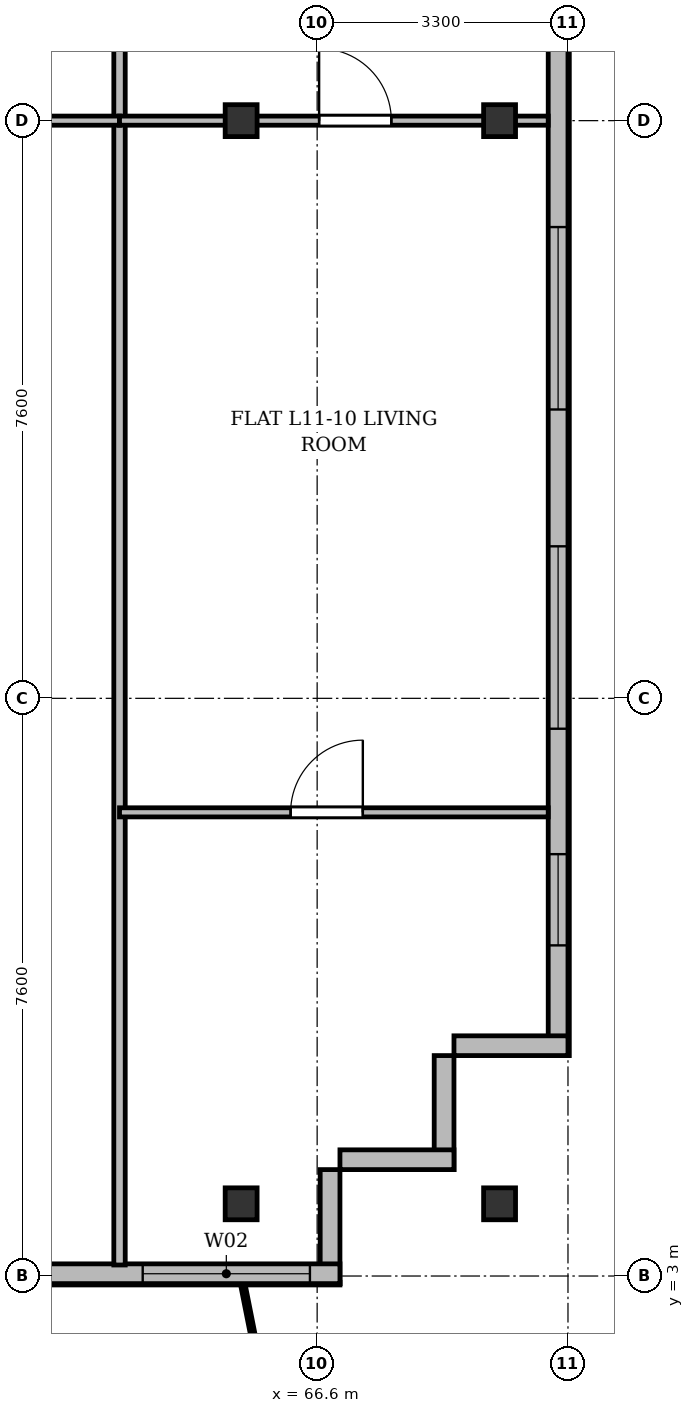
"""IFC4 building model, lengths in metres.
Left out: names, types, materials, properties, quantities, classifications, styles, units other than length and angle.
Written with IfcOpenShell. Run it as: python <this file> out.ifc"""

import sys

from ifc_helpers import new_model, si_unit, direction, frame, frame_2d, origin, origin_2d, place, context, subcontext, project, spatial, rectangle, i_section, extrude, source, transform, mapped, element, fill, save


model = new_model("IFC4")
c1 = context("Model", 3, precision=1e-05, world=origin(), true_north=direction((0.0, 1.0)))
c2 = subcontext(c1, "Body", "Model", "MODEL_VIEW")
j1 = project(units=[si_unit("LENGTHUNIT", "METRE"), si_unit("PLANEANGLEUNIT", "RADIAN")], contexts=[c1])
p1 = place(None, origin())
s1 = spatial("IfcSite", under=j1, at=p1, CompositionType="ELEMENT")
p2 = place(p1, origin())
s2 = spatial("IfcBuilding", under=s1, at=p2, CompositionType="ELEMENT")
p3 = place(p2, frame((0.0, 0.0, 45.1)))
s3 = spatial("IfcBuildingStorey", under=s2, at=p3, CompositionType="ELEMENT", Elevation=45.1)
m1 = source(origin(), c2, "Body", "SweptSolid", [
    extrude(i_section(OverallWidth=0.42, OverallDepth=0.42, WebThickness=0.026, FlangeThickness=0.04, at=origin_2d()), origin(), (0.0, 0.0, 1.0), 3.6),
])
for number, where, z_axis, x_axis in (
    (1, (65.6, 3.95, 0.0), (0.0, 0.0, 1.0), (1.0, 0.0, 0.0)),
    (2, (65.6, 18.2, 0.0), (0.0, 0.0, 1.0), (1.0, 0.0, 0.0)),
    (3, (69.0, 3.95, 0.0), (0.0, 0.0, 1.0), (1.0, 0.0, 0.0)),
    (4, (69.0, 18.2, 0.0), (0.0, 0.0, 1.0), (1.0, 0.0, 0.0)),
):
    element("IfcColumn", number, at=place(p3, frame(where, z_axis=z_axis, x_axis=x_axis)), inside=s3, PredefinedType="COLUMN", context=c2, shape_type="MappedRepresentation", body=[
        mapped(m1, transform((0.0, 0.0, 0.0), x_axis=(1.0, 0.0, 0.0), y_axis=(0.0, 1.0, 0.0), z_axis=(0.0, 0.0, 1.0), scale=1.0)),
    ])
p4 = place(p3, frame((69.77, 45.5, 0.0), z_axis=(0.0, 0.0, 1.0), x_axis=(0.0, -1.0, 0.0)))
e5 = element("IfcWall", 5, at=p4, inside=s3, PredefinedType="SOLIDWALL", context=c2, shape_type="SweptSolid", body=[
    extrude(rectangle(XDim=39.6, YDim=0.26, at=frame_2d((19.8, 0.0))), origin(), (0.0, 0.0, 1.0), 3.34),
])
p5 = place(p4, frame((36.95, 0.0, 0.92)))
e6 = element("IfcOpeningElement", 6, at=p5, cuts=e5, PredefinedType="OPENING", context=c2, shape_type="SweptSolid", body=[
    extrude(rectangle(XDim=1.2, YDim=1.65, at=frame_2d((0.6, 0.825))), frame((0.0, 0.14, 0.0), z_axis=(0.0, -1.0, 0.0), x_axis=(1.0, 0.0, 0.0)), (0.0, 0.0, 1.0), 0.28),
])
p6 = place(p4, frame((32.9, 0.0, 0.92)))
e7 = element("IfcOpeningElement", 7, at=p6, cuts=e5, PredefinedType="OPENING", context=c2, shape_type="SweptSolid", body=[
    extrude(rectangle(XDim=2.4, YDim=2.1, at=frame_2d((1.2, 1.05))), frame((0.0, 0.14, 0.0), z_axis=(0.0, -1.0, 0.0), x_axis=(1.0, 0.0, 0.0)), (0.0, 0.0, 1.0), 0.28),
])
p7 = place(p4, frame((28.7, 0.0, 0.92)))
e8 = element("IfcOpeningElement", 8, at=p7, cuts=e5, PredefinedType="OPENING", context=c2, shape_type="SweptSolid", body=[
    extrude(rectangle(XDim=2.4, YDim=2.1, at=frame_2d((1.2, 1.05))), frame((0.0, 0.14, 0.0), z_axis=(0.0, -1.0, 0.0), x_axis=(1.0, 0.0, 0.0)), (0.0, 0.0, 1.0), 0.28),
])
p8 = place(p4, frame((21.5, 0.0, 0.92)))
e9 = element("IfcOpeningElement", 9, at=p8, cuts=e5, PredefinedType="OPENING", context=c2, shape_type="SweptSolid", body=[
    extrude(rectangle(XDim=2.4, YDim=2.1, at=frame_2d((1.2, 1.05))), frame((0.0, 0.14, 0.0), z_axis=(0.0, -1.0, 0.0), x_axis=(1.0, 0.0, 0.0)), (0.0, 0.0, 1.0), 0.28),
])
p9 = place(p4, frame((7.5, 0.0, 0.92)))
e10 = element("IfcOpeningElement", 10, at=p9, cuts=e5, PredefinedType="OPENING", context=c2, shape_type="SweptSolid", body=[
    extrude(rectangle(XDim=2.4, YDim=2.1, at=frame_2d((1.2, 1.05))), frame((0.0, 0.14, 0.0), z_axis=(0.0, -1.0, 0.0), x_axis=(1.0, 0.0, 0.0)), (0.0, 0.0, 1.0), 0.28),
])
p10 = place(p4, frame((4.5, 0.0, 0.92)))
e11 = element("IfcOpeningElement", 11, at=p10, cuts=e5, PredefinedType="OPENING", context=c2, shape_type="SweptSolid", body=[
    extrude(rectangle(XDim=1.2, YDim=1.65, at=frame_2d((0.6, 0.825))), frame((0.0, 0.14, 0.0), z_axis=(0.0, -1.0, 0.0), x_axis=(1.0, 0.0, 0.0)), (0.0, 0.0, 1.0), 0.28),
])
p11 = place(p4, frame((1.15, 0.0, 0.92)))
e12 = element("IfcOpeningElement", 12, at=p11, cuts=e5, PredefinedType="OPENING", context=c2, shape_type="SweptSolid", body=[
    extrude(rectangle(XDim=1.2, YDim=1.65, at=frame_2d((0.6, 0.825))), frame((0.0, 0.14, 0.0), z_axis=(0.0, -1.0, 0.0), x_axis=(1.0, 0.0, 0.0)), (0.0, 0.0, 1.0), 0.28),
])
p12 = place(p3, frame((69.9, 6.03, 0.0), z_axis=(0.0, 0.0, 1.0), x_axis=(-1.0, 0.0, 0.0)))
e13 = element("IfcWall", 13, at=p12, inside=s3, PredefinedType="SOLIDWALL", context=c2, shape_type="SweptSolid", body=[
    extrude(rectangle(XDim=1.5, YDim=0.26, at=frame_2d((0.75, 0.0))), origin(), (0.0, 0.0, 1.0), 2.752),
])
for number, where, z_axis, x_axis in (
    (14, (68.27, 5.9, 0.0), (0.0, 0.0, 1.0), (0.0, -1.0, 0.0)),
    (15, (68.4, 4.53, 0.0), (0.0, 0.0, 1.0), (-1.0, 0.0, 0.0)),
):
    element("IfcWall", number, at=place(p3, frame(where, z_axis=z_axis, x_axis=x_axis)), inside=s3, PredefinedType="SOLIDWALL", context=c2, shape_type="SweptSolid", body=[
        extrude(rectangle(XDim=1.5, YDim=0.26, at=frame_2d((0.75, 0.0))), origin(), (0.0, 0.0, 1.0), 3.34),
    ])
p13 = place(p3, frame((66.77, 4.4, 0.0), z_axis=(0.0, 0.0, 1.0), x_axis=(0.0, -1.0, 0.0)))
e16 = element("IfcWall", 16, at=p13, inside=s3, PredefinedType="SOLIDWALL", context=c2, shape_type="SweptSolid", body=[
    extrude(rectangle(XDim=1.5, YDim=0.26, at=frame_2d((0.75, 0.0))), origin(), (0.0, 0.0, 1.0), 2.69),
])
p14 = place(p3, frame((66.9, 3.03, 0.0), z_axis=(0.0, 0.0, 1.0), x_axis=(-1.0, 0.0, 0.0)))
e17 = element("IfcWall", 17, at=p14, inside=s3, PredefinedType="SOLIDWALL", context=c2, shape_type="SweptSolid", body=[
    extrude(rectangle(XDim=59.4, YDim=0.26, at=frame_2d((29.7, 0.0))), origin(), (0.0, 0.0, 1.0), 3.34),
])
p15 = place(p14, frame((0.395, 0.0, 0.9)))
e18 = element("IfcOpeningElement", 18, at=p15, cuts=e17, PredefinedType="OPENING", context=c2, shape_type="SweptSolid", body=[
    extrude(rectangle(XDim=2.2, YDim=1.8, at=frame_2d((1.1, 0.9))), frame((0.0, 0.14, 0.0), z_axis=(0.0, -1.0, 0.0), x_axis=(1.0, 0.0, 0.0)), (0.0, 0.0, 1.0), 0.28),
])
p16 = place(p14, frame((4.75, 0.0, 0.9)))
e19 = element("IfcOpeningElement", 19, at=p16, cuts=e17, PredefinedType="OPENING", context=c2, shape_type="SweptSolid", body=[
    extrude(rectangle(XDim=1.5, YDim=1.75, at=frame_2d((0.75, 0.875))), frame((0.0, 0.14, 0.0), z_axis=(0.0, -1.0, 0.0), x_axis=(1.0, 0.0, 0.0)), (0.0, 0.0, 1.0), 0.28),
])
p17 = place(p14, frame((11.0, 0.0, 0.9)))
e20 = element("IfcOpeningElement", 20, at=p17, cuts=e17, PredefinedType="OPENING", context=c2, shape_type="SweptSolid", body=[
    extrude(rectangle(XDim=2.0, YDim=1.95, at=frame_2d((1.0, 0.975))), frame((0.0, 0.14, 0.0), z_axis=(0.0, -1.0, 0.0), x_axis=(1.0, 0.0, 0.0)), (0.0, 0.0, 1.0), 0.28),
])
p18 = place(p14, frame((17.007, 0.0, 0.0)))
e21 = element("IfcOpeningElement", 21, at=p18, cuts=e17, PredefinedType="OPENING", context=c2, shape_type="SweptSolid", body=[
    extrude(rectangle(XDim=1.2, YDim=2.2, at=frame_2d((0.6, 1.1))), frame((0.0, 0.14, 0.0), z_axis=(0.0, -1.0, 0.0), x_axis=(1.0, 0.0, 0.0)), (0.0, 0.0, 1.0), 0.28),
])
p19 = place(p14, frame((20.4, 0.0, 0.9)))
e22 = element("IfcOpeningElement", 22, at=p19, cuts=e17, PredefinedType="OPENING", context=c2, shape_type="SweptSolid", body=[
    extrude(rectangle(XDim=1.8, YDim=1.8, at=frame_2d((0.9, 0.9))), frame((0.0, 0.14, 0.0), z_axis=(0.0, -1.0, 0.0), x_axis=(1.0, 0.0, 0.0)), (0.0, 0.0, 1.0), 0.28),
])
p20 = place(p14, frame((24.4, 0.0, 0.9)))
e23 = element("IfcOpeningElement", 23, at=p20, cuts=e17, PredefinedType="OPENING", context=c2, shape_type="SweptSolid", body=[
    extrude(rectangle(XDim=2.2, YDim=1.8, at=frame_2d((1.1, 0.9))), frame((0.0, 0.14, 0.0), z_axis=(0.0, -1.0, 0.0), x_axis=(1.0, 0.0, 0.0)), (0.0, 0.0, 1.0), 0.28),
])
p21 = place(p14, frame((31.35, 0.0, 0.9)))
e24 = element("IfcOpeningElement", 24, at=p21, cuts=e17, PredefinedType="OPENING", context=c2, shape_type="SweptSolid", body=[
    extrude(rectangle(XDim=1.5, YDim=1.75, at=frame_2d((0.75, 0.875))), frame((0.0, 0.14, 0.0), z_axis=(0.0, -1.0, 0.0), x_axis=(1.0, 0.0, 0.0)), (0.0, 0.0, 1.0), 0.28),
])
p22 = place(p14, frame((38.9, 0.0, 0.9)))
e25 = element("IfcOpeningElement", 25, at=p22, cuts=e17, PredefinedType="OPENING", context=c2, shape_type="SweptSolid", body=[
    extrude(rectangle(XDim=2.0, YDim=1.95, at=frame_2d((1.0, 0.975))), frame((0.0, 0.14, 0.0), z_axis=(0.0, -1.0, 0.0), x_axis=(1.0, 0.0, 0.0)), (0.0, 0.0, 1.0), 0.28),
])
p23 = place(p14, frame((45.435, 0.0, 0.0)))
e26 = element("IfcOpeningElement", 26, at=p23, cuts=e17, PredefinedType="OPENING", context=c2, shape_type="SweptSolid", body=[
    extrude(rectangle(XDim=1.2, YDim=2.2, at=frame_2d((0.6, 1.1))), frame((0.0, 0.14, 0.0), z_axis=(0.0, -1.0, 0.0), x_axis=(1.0, 0.0, 0.0)), (0.0, 0.0, 1.0), 0.28),
])
p24 = place(p14, frame((48.45, 0.0, 0.9)))
e27 = element("IfcOpeningElement", 27, at=p24, cuts=e17, PredefinedType="OPENING", context=c2, shape_type="SweptSolid", body=[
    extrude(rectangle(XDim=1.8, YDim=1.8, at=frame_2d((0.9, 0.9))), frame((0.0, 0.14, 0.0), z_axis=(0.0, -1.0, 0.0), x_axis=(1.0, 0.0, 0.0)), (0.0, 0.0, 1.0), 0.28),
])
p25 = place(p14, frame((52.0, 0.0, 0.9)))
e28 = element("IfcOpeningElement", 28, at=p25, cuts=e17, PredefinedType="OPENING", context=c2, shape_type="SweptSolid", body=[
    extrude(rectangle(XDim=2.2, YDim=1.8, at=frame_2d((1.1, 0.9))), frame((0.0, 0.14, 0.0), z_axis=(0.0, -1.0, 0.0), x_axis=(1.0, 0.0, 0.0)), (0.0, 0.0, 1.0), 0.28),
])
p26 = place(p14, frame((56.355, 0.0, 0.9)))
e29 = element("IfcOpeningElement", 29, at=p26, cuts=e17, PredefinedType="OPENING", context=c2, shape_type="SweptSolid", body=[
    extrude(rectangle(XDim=1.5, YDim=1.75, at=frame_2d((0.75, 0.875))), frame((0.0, 0.14, 0.0), z_axis=(0.0, -1.0, 0.0), x_axis=(1.0, 0.0, 0.0)), (0.0, 0.0, 1.0), 0.28),
])
p27 = place(p3, frame((64.0, 3.145, 0.0), z_axis=(0.0, 0.0, 1.0), x_axis=(0.0, 1.0, 0.0)))
e30 = element("IfcWall", 30, at=p27, inside=s3, PredefinedType="PARTITIONING", context=c2, shape_type="SweptSolid", body=[
    extrude(rectangle(XDim=24.455, YDim=0.15, at=frame_2d((12.228, 0.0))), origin(), (0.0, 0.0, 1.0), 2.69),
])
p28 = place(p3, frame((58.8, 18.2, 0.0), z_axis=(0.0, 0.0, 1.0), x_axis=(1.0, 0.0, 0.0)))
e31 = element("IfcWall", 31, at=p28, inside=s3, PredefinedType="PARTITIONING", context=c2, shape_type="SweptSolid", body=[
    extrude(rectangle(XDim=5.2, YDim=0.12, at=frame_2d((2.6, 0.0))), origin(), (0.0, 0.0, 1.0), 2.69),
])
p29 = place(p28, frame((2.033, 0.0, 0.0)))
e32 = element("IfcOpeningElement", 32, at=p29, cuts=e31, PredefinedType="OPENING", context=c2, shape_type="SweptSolid", body=[
    extrude(rectangle(XDim=0.95, YDim=2.15, at=frame_2d((0.475, 1.075))), frame((0.0, 0.07, 0.0), z_axis=(0.0, -1.0, 0.0), x_axis=(1.0, 0.0, 0.0)), (0.0, 0.0, 1.0), 0.14),
])
p30 = place(p3, frame((64.0, 18.2, 0.0), z_axis=(0.0, 0.0, 1.0), x_axis=(1.0, 0.0, 0.0)))
e33 = element("IfcWall", 33, at=p30, inside=s3, PredefinedType="PARTITIONING", context=c2, shape_type="SweptSolid", body=[
    extrude(rectangle(XDim=5.64, YDim=0.12, at=frame_2d((2.82, 0.0))), origin(), (0.0, 0.0, 1.0), 2.69),
])
p31 = place(p30, frame((2.626, 0.0, 0.0)))
e34 = element("IfcOpeningElement", 34, at=p31, cuts=e33, PredefinedType="OPENING", context=c2, shape_type="SweptSolid", body=[
    extrude(rectangle(XDim=0.95, YDim=2.15, at=frame_2d((0.475, 1.075))), frame((0.0, 0.07, 0.0), z_axis=(0.0, -1.0, 0.0), x_axis=(1.0, 0.0, 0.0)), (0.0, 0.0, 1.0), 0.14),
])
p32 = place(p3, frame((64.0, 9.1, 0.0), z_axis=(0.0, 0.0, 1.0), x_axis=(1.0, 0.0, 0.0)))
e35 = element("IfcWall", 35, at=p32, inside=s3, PredefinedType="PARTITIONING", context=c2, shape_type="SweptSolid", body=[
    extrude(rectangle(XDim=5.64, YDim=0.12, at=frame_2d((2.82, 0.0))), origin(), (0.0, 0.0, 1.0), 2.752),
])
p33 = place(p32, frame((2.251, 0.0, 0.0)))
e36 = element("IfcOpeningElement", 36, at=p33, cuts=e35, PredefinedType="OPENING", context=c2, shape_type="SweptSolid", body=[
    extrude(rectangle(XDim=0.95, YDim=2.15, at=frame_2d((0.475, 1.075))), frame((0.0, 0.07, 0.0), z_axis=(0.0, -1.0, 0.0), x_axis=(1.0, 0.0, 0.0)), (0.0, 0.0, 1.0), 0.14),
])
m2 = source(origin(), c2, "Body", "SweptSolid", [
    extrude(rectangle(XDim=1.2, YDim=1.65, at=frame_2d((0.6, 0.825))), frame((0.0, 0.03, 0.0), z_axis=(0.0, -1.0, 0.0), x_axis=(1.0, 0.0, 0.0)), (0.0, 0.0, 1.0), 0.06),
])
p34 = place(p5, origin())
e37 = element("IfcWindow", 37, at=p34, inside=s3, PartitioningType="SINGLE_PANEL", PredefinedType="WINDOW", context=c2, shape_type="MappedRepresentation", body=[
    mapped(m2, transform((0.0, 0.0, 0.0), x_axis=(1.0, 0.0, 0.0), y_axis=(0.0, 1.0, 0.0), z_axis=(0.0, 0.0, 1.0), scale=1.0)),
])
fill(e6, e37)
m3 = source(origin(), c2, "Body", "SweptSolid", [
    extrude(rectangle(XDim=2.4, YDim=2.1, at=frame_2d((1.2, 1.05))), frame((0.0, 0.03, 0.0), z_axis=(0.0, -1.0, 0.0), x_axis=(1.0, 0.0, 0.0)), (0.0, 0.0, 1.0), 0.06),
])
p35 = place(p6, origin())
e38 = element("IfcWindow", 38, at=p35, inside=s3, PartitioningType="SINGLE_PANEL", PredefinedType="WINDOW", context=c2, shape_type="MappedRepresentation", body=[
    mapped(m3, transform((0.0, 0.0, 0.0), x_axis=(1.0, 0.0, 0.0), y_axis=(0.0, 1.0, 0.0), z_axis=(0.0, 0.0, 1.0), scale=1.0)),
])
fill(e7, e38)
p36 = place(p7, origin())
e39 = element("IfcWindow", 39, at=p36, inside=s3, PartitioningType="SINGLE_PANEL", PredefinedType="WINDOW", context=c2, shape_type="MappedRepresentation", body=[
    mapped(m3, transform((0.0, 0.0, 0.0), x_axis=(1.0, 0.0, 0.0), y_axis=(0.0, 1.0, 0.0), z_axis=(0.0, 0.0, 1.0), scale=1.0)),
])
fill(e8, e39)
m4 = source(origin(), c2, "Body", "SweptSolid", [
    extrude(rectangle(XDim=2.2, YDim=1.8, at=frame_2d((1.1, 0.9))), frame((0.0, 0.03, 0.0), z_axis=(0.0, -1.0, 0.0), x_axis=(1.0, 0.0, 0.0)), (0.0, 0.0, 1.0), 0.06),
])
p37 = place(p15, origin())
e40 = element("IfcWindow", 40, at=p37, inside=s3, PartitioningType="SINGLE_PANEL", PredefinedType="WINDOW", context=c2, shape_type="MappedRepresentation", body=[
    mapped(m4, transform((0.0, 0.0, 0.0), x_axis=(1.0, 0.0, 0.0), y_axis=(0.0, 1.0, 0.0), z_axis=(0.0, 0.0, 1.0), scale=1.0)),
])
fill(e18, e40)
m5 = source(origin(), c2, "Body", "SweptSolid", [
    extrude(rectangle(XDim=0.95, YDim=2.15, at=frame_2d((0.475, 1.075))), frame((0.0, 0.025, 0.0), z_axis=(0.0, -1.0, 0.0), x_axis=(1.0, 0.0, 0.0)), (0.0, 0.0, 1.0), 0.05),
])
p38 = place(p31, origin())
e41 = element("IfcDoor", 41, at=p38, inside=s3, OperationType="SINGLE_SWING_LEFT", PredefinedType="DOOR", context=c2, shape_type="MappedRepresentation", body=[
    mapped(m5, transform((0.0, 0.0, 0.0), x_axis=(1.0, 0.0, 0.0), y_axis=(0.0, 1.0, 0.0), z_axis=(0.0, 0.0, 1.0), scale=1.0)),
])
fill(e34, e41)
p39 = place(p33, origin())
e42 = element("IfcDoor", 42, at=p39, inside=s3, OperationType="SINGLE_SWING_RIGHT", PredefinedType="DOOR", context=c2, shape_type="MappedRepresentation", body=[
    mapped(m5, transform((0.0, 0.0, 0.0), x_axis=(1.0, 0.0, 0.0), y_axis=(0.0, 1.0, 0.0), z_axis=(0.0, 0.0, 1.0), scale=1.0)),
])
fill(e36, e42)
save(model, sys.argv[1])
